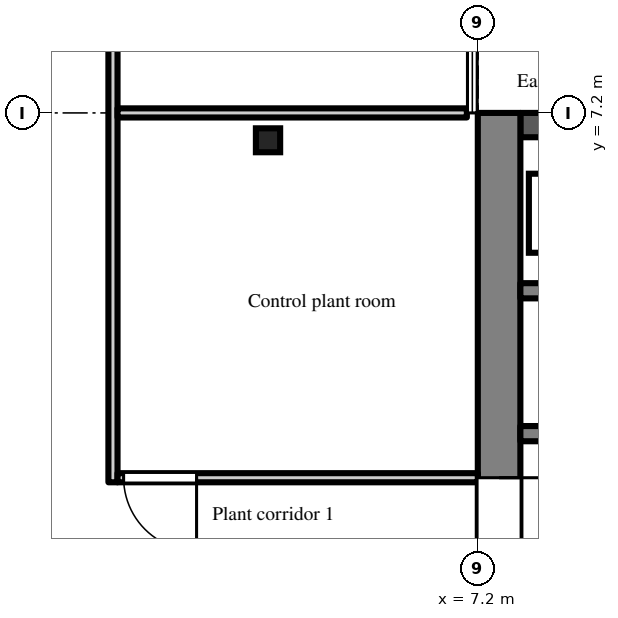
"""IFC4 building model, lengths in metres.
Left out: names, types, materials, properties, quantities, classifications, styles, units other than length and angle.
Written with IfcOpenShell. Run it as: python <this file> out.ifc"""

import sys

from ifc_helpers import new_model, si_unit, direction, frame, frame_2d, origin, origin_2d, place, context, subcontext, project, spatial, polyline, rectangle, i_section, outline, extrude, element, fill, save


model = new_model("IFC4")
c1 = context("Model", 3, precision=1e-05, world=origin(), true_north=direction((0.0, 1.0)))
c2 = subcontext(c1, "Body", "Model", "MODEL_VIEW")
j1 = project(units=[si_unit("LENGTHUNIT", "METRE"), si_unit("PLANEANGLEUNIT", "RADIAN")], contexts=[c1])
p1 = place(None, origin())
s1 = spatial("IfcSite", under=j1, at=p1, CompositionType="ELEMENT")
p2 = place(p1, origin())
s2 = spatial("IfcBuilding", under=s1, at=p2, CompositionType="ELEMENT")
p3 = place(p2, frame((0.0, 0.0, 247.5)))
s3 = spatial("IfcBuildingStorey", under=s2, at=p3, CompositionType="ELEMENT", Elevation=247.5)
p4 = place(p3, frame((3.75, 6.75, 0.0), z_axis=(0.0, 0.0, 1.0), x_axis=(1.0, 0.0, 0.0)))
e1 = element("IfcColumn", 1, at=p4, inside=s3, PredefinedType="COLUMN", context=c2, shape_type="SweptSolid", body=[
    extrude(i_section(OverallWidth=0.399, OverallDepth=0.394, WebThickness=0.023, FlangeThickness=0.037, FilletRadius=0.015, at=origin_2d()), origin(), (0.0, 0.0, 1.0), 9.663),
])
p5 = place(p3, frame((7.55, -7.2, 0.0), z_axis=(0.0, 0.0, 1.0), x_axis=(0.0, 1.0, 0.0)))
e2 = element("IfcWall", 2, at=p5, inside=s3, PredefinedType="SHEAR", context=c2, shape_type="SweptSolid", body=[
    extrude(outline(polyline([(0.0, 0.0), (14.4, 0.0), (14.4, 10.033), (7.2, 13.7), (0.0, 10.033), (0.0, 0.0)])), frame((0.0, 0.35, 0.0), z_axis=(0.0, -1.0, 0.0), x_axis=(1.0, 0.0, 0.0)), (0.0, 0.0, 1.0), 0.7),
])
p6 = place(p5, frame((6.0, 0.0, 0.0)))
e3 = element("IfcOpeningElement", 3, at=p6, cuts=e2, PredefinedType="OPENING", context=c2, shape_type="SweptSolid", body=[
    extrude(rectangle(XDim=2.4, YDim=2.2, at=frame_2d((1.2, 1.1))), frame((0.0, 0.36, 0.0), z_axis=(0.0, -1.0, 0.0), x_axis=(1.0, 0.0, 0.0)), (0.0, 0.0, 1.0), 0.72),
])
p7 = place(p3, frame((7.9, 7.0, 0.0), z_axis=(0.0, 0.0, 1.0), x_axis=(1.0, 0.0, 0.0)))
e4 = element("IfcWall", 4, at=p7, inside=s3, PredefinedType="SHEAR", context=c2, shape_type="SweptSolid", body=[
    extrude(rectangle(XDim=12.95, YDim=0.4, at=frame_2d((6.475, 0.0))), origin(), (0.0, 0.0, 1.0), 10.135),
])
p8 = place(p3, frame((7.9, 1.925, 0.0), z_axis=(0.0, 0.0, 1.0), x_axis=(1.0, 0.0, 0.0)))
e5 = element("IfcWall", 5, at=p8, inside=s3, PredefinedType="SHEAR", context=c2, shape_type="SweptSolid", body=[
    extrude(rectangle(XDim=12.95, YDim=0.25, at=frame_2d((6.475, 0.0))), origin(), (0.0, 0.0, 1.0), 12.72),
])
p9 = place(p8, frame((0.525, 0.0, 0.0)))
e6 = element("IfcOpeningElement", 6, at=p9, cuts=e5, PredefinedType="OPENING", context=c2, shape_type="SweptSolid", body=[
    extrude(rectangle(XDim=0.9, YDim=2.1, at=frame_2d((0.45, 1.05))), frame((0.0, 0.135, 0.0), z_axis=(0.0, -1.0, 0.0), x_axis=(1.0, 0.0, 0.0)), (0.0, 0.0, 1.0), 0.27),
])
p10 = place(p8, frame((2.625, 0.0, 0.0)))
e7 = element("IfcOpeningElement", 7, at=p10, cuts=e5, PredefinedType="OPENING", context=c2, shape_type="SweptSolid", body=[
    extrude(rectangle(XDim=1.1, YDim=2.1, at=frame_2d((0.55, 1.05))), frame((0.0, 0.135, 0.0), z_axis=(0.0, -1.0, 0.0), x_axis=(1.0, 0.0, 0.0)), (0.0, 0.0, 1.0), 0.27),
])
p11 = place(p8, frame((4.925, 0.0, 0.0)))
e8 = element("IfcOpeningElement", 8, at=p11, cuts=e5, PredefinedType="OPENING", context=c2, shape_type="SweptSolid", body=[
    extrude(rectangle(XDim=0.9, YDim=2.1, at=frame_2d((0.45, 1.05))), frame((0.0, 0.135, 0.0), z_axis=(0.0, -1.0, 0.0), x_axis=(1.0, 0.0, 0.0)), (0.0, 0.0, 1.0), 0.27),
])
p12 = place(p8, frame((8.225, 0.0, 0.0)))
e9 = element("IfcOpeningElement", 9, at=p12, cuts=e5, PredefinedType="OPENING", context=c2, shape_type="SweptSolid", body=[
    extrude(rectangle(XDim=0.9, YDim=2.1, at=frame_2d((0.45, 1.05))), frame((0.0, 0.135, 0.0), z_axis=(0.0, -1.0, 0.0), x_axis=(1.0, 0.0, 0.0)), (0.0, 0.0, 1.0), 0.27),
])
p13 = place(p8, frame((11.525, 0.0, 0.0)))
e10 = element("IfcOpeningElement", 10, at=p13, cuts=e5, PredefinedType="OPENING", context=c2, shape_type="SweptSolid", body=[
    extrude(rectangle(XDim=0.9, YDim=2.1, at=frame_2d((0.45, 1.05))), frame((0.0, 0.135, 0.0), z_axis=(0.0, -1.0, 0.0), x_axis=(1.0, 0.0, 0.0)), (0.0, 0.0, 1.0), 0.27),
])
p14 = place(p3, frame((7.9, 4.275, 0.0), z_axis=(0.0, 0.0, 1.0), x_axis=(1.0, 0.0, 0.0)))
e11 = element("IfcWall", 11, at=p14, inside=s3, PredefinedType="SHEAR", context=c2, shape_type="SweptSolid", body=[
    extrude(rectangle(XDim=1.95, YDim=0.25, at=frame_2d((0.975, 0.0))), origin(), (0.0, 0.0, 1.0), 11.523),
])
p15 = place(p3, frame((1.2, 1.125, 0.0), z_axis=(0.0, 0.0, 1.0), x_axis=(0.0, 1.0, 0.0)))
e12 = element("IfcWall", 12, at=p15, inside=s3, PredefinedType="PARTITIONING", context=c2, shape_type="SweptSolid", body=[
    extrude(rectangle(XDim=20.295, YDim=0.15, at=frame_2d((10.147, 0.0))), origin(), (0.0, 0.0, 1.0), 2.7),
])
p16 = place(p15, frame((9.075, 0.0, 0.0)))
e13 = element("IfcOpeningElement", 13, at=p16, cuts=e12, PredefinedType="OPENING", context=c2, shape_type="SweptSolid", body=[
    extrude(rectangle(XDim=1.2, YDim=2.1, at=frame_2d((0.6, 1.05))), frame((0.0, 0.085, 0.0), z_axis=(0.0, -1.0, 0.0), x_axis=(1.0, 0.0, 0.0)), (0.0, 0.0, 1.0), 0.17),
])
p17 = place(p15, frame((16.125, 0.0, 0.0)))
e14 = element("IfcOpeningElement", 14, at=p17, cuts=e12, PredefinedType="OPENING", context=c2, shape_type="SweptSolid", body=[
    extrude(rectangle(XDim=1.2, YDim=2.1, at=frame_2d((0.6, 1.05))), frame((0.0, 0.085, 0.0), z_axis=(0.0, -1.0, 0.0), x_axis=(1.0, 0.0, 0.0)), (0.0, 0.0, 1.0), 0.17),
])
p18 = place(p3, frame((1.275, 1.2, 0.0), z_axis=(0.0, 0.0, 1.0), x_axis=(1.0, 0.0, 0.0)))
e15 = element("IfcWall", 15, at=p18, inside=s3, PredefinedType="PARTITIONING", context=c2, shape_type="SweptSolid", body=[
    extrude(rectangle(XDim=5.925, YDim=0.15, at=frame_2d((2.962, 0.0))), origin(), (0.0, 0.0, 1.0), 2.7),
])
p19 = place(p18, frame((0.1, 0.0, 0.0)))
e16 = element("IfcOpeningElement", 16, at=p19, cuts=e15, PredefinedType="OPENING", context=c2, shape_type="SweptSolid", body=[
    extrude(rectangle(XDim=1.2, YDim=2.1, at=frame_2d((0.6, 1.05))), frame((0.0, 0.085, 0.0), z_axis=(0.0, -1.0, 0.0), x_axis=(1.0, 0.0, 0.0)), (0.0, 0.0, 1.0), 0.17),
])
p20 = place(p3, frame((1.275, 7.2, 0.0), z_axis=(0.0, 0.0, 1.0), x_axis=(1.0, 0.0, 0.0)))
e17 = element("IfcWall", 17, at=p20, inside=s3, PredefinedType="PARTITIONING", context=c2, shape_type="SweptSolid", body=[
    extrude(rectangle(XDim=5.745, YDim=0.15, at=frame_2d((2.873, 0.0))), origin(), (0.0, 0.0, 1.0), 2.7),
])
p21 = place(p6, frame((2.4, 0.0, 0.0), z_axis=(0.0, 0.0, 1.0), x_axis=(-1.0, 0.0, 0.0)))
e18 = element("IfcDoor", 18, at=p21, inside=s3, OperationType="DOUBLE_DOOR_DOUBLE_SWING", PredefinedType="DOOR", context=c2, shape_type="SweptSolid", body=[
    extrude(rectangle(XDim=2.4, YDim=2.2, at=frame_2d((1.2, 1.1))), frame((0.0, 0.025, 0.0), z_axis=(0.0, -1.0, 0.0), x_axis=(1.0, 0.0, 0.0)), (0.0, 0.0, 1.0), 0.05),
])
fill(e3, e18)
p22 = place(p19, frame((1.2, 0.0, 0.0), z_axis=(0.0, 0.0, 1.0), x_axis=(-1.0, 0.0, 0.0)))
e19 = element("IfcDoor", 19, at=p22, inside=s3, OperationType="SINGLE_SWING_LEFT", PredefinedType="DOOR", context=c2, shape_type="SweptSolid", body=[
    extrude(rectangle(XDim=1.2, YDim=2.1, at=frame_2d((0.6, 1.05))), frame((0.0, 0.025, 0.0), z_axis=(0.0, -1.0, 0.0), x_axis=(1.0, 0.0, 0.0)), (0.0, 0.0, 1.0), 0.05),
])
fill(e16, e19)
save(model, sys.argv[1])
